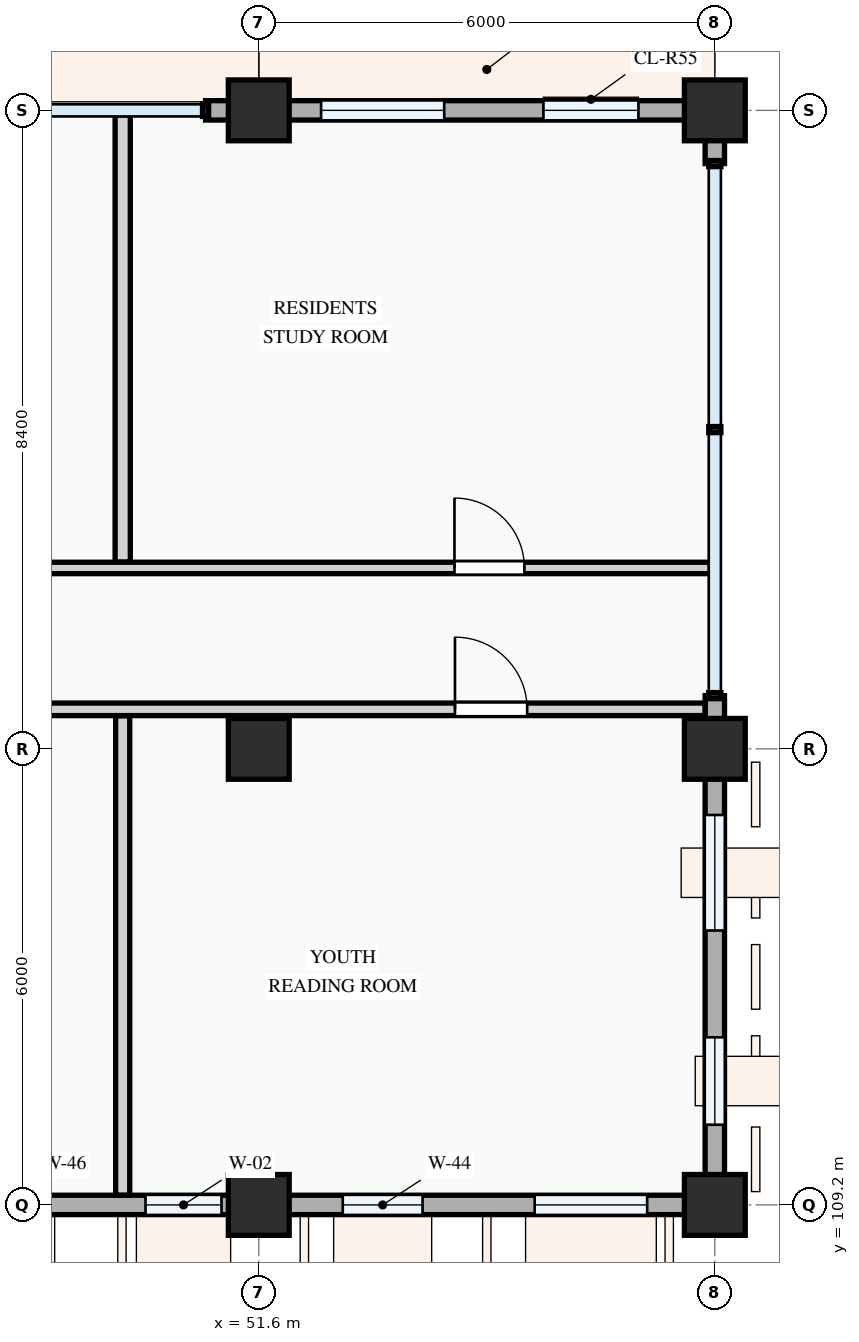
"""IFC4 building model, lengths in metres.
Left out: names, types, materials, properties, quantities, classifications, styles, units other than length and angle.
Written with IfcOpenShell. Run it as: python <this file> out.ifc"""

import sys

from ifc_helpers import new_model, si_unit, direction, frame, frame_2d, origin, origin_2d, place, context, subcontext, project, spatial, rectangle, extrude, element, fill, save


model = new_model("IFC4")
c1 = context("Model", 3, precision=1e-05, world=origin(), true_north=direction((0.0, 1.0)))
c2 = subcontext(c1, "Body", "Model", "MODEL_VIEW")
j1 = project(units=[si_unit("LENGTHUNIT", "METRE"), si_unit("PLANEANGLEUNIT", "RADIAN")], contexts=[c1])
p1 = place(None, origin())
s1 = spatial("IfcSite", under=j1, at=p1, CompositionType="ELEMENT")
p2 = place(p1, origin())
s2 = spatial("IfcBuilding", under=s1, at=p2, CompositionType="ELEMENT")
p3 = place(p2, frame((0.0, 0.0, 4.5)))
s3 = spatial("IfcBuildingStorey", under=s2, at=p3, CompositionType="ELEMENT", Elevation=4.5)
for number, where, z_axis, x_axis in (
    (1, (51.6, 109.2, 0.0), (0.0, 0.0, 1.0), (1.0, 0.0, 0.0)),
    (2, (51.6, 115.2, 0.0), (0.0, 0.0, 1.0), (1.0, 0.0, 0.0)),
    (3, (51.6, 123.6, 0.0), (0.0, 0.0, 1.0), (1.0, 0.0, 0.0)),
    (4, (57.6, 109.2, 0.0), (0.0, 0.0, 1.0), (1.0, 0.0, 0.0)),
    (5, (57.6, 115.2, 0.0), (0.0, 0.0, 1.0), (1.0, 0.0, 0.0)),
    (6, (57.6, 123.6, 0.0), (0.0, 0.0, 1.0), (1.0, 0.0, 0.0)),
):
    element("IfcColumn", number, at=place(p3, frame(where, z_axis=z_axis, x_axis=x_axis)), inside=s3, PredefinedType="COLUMN", context=c2, shape_type="SweptSolid", body=[
        extrude(rectangle(XDim=0.8, YDim=0.8, at=origin_2d()), origin(), (0.0, 0.0, 1.0), 3.6),
    ])
p4 = place(p3, frame((43.2, 109.2, 0.0), z_axis=(0.0, 0.0, 1.0), x_axis=(1.0, 0.0, 0.0)))
e7 = element("IfcWall", 7, at=p4, inside=s3, PredefinedType="STANDARD", context=c2, shape_type="SweptSolid", body=[
    extrude(rectangle(XDim=8.4, YDim=0.255, at=frame_2d((4.2, 0.0))), origin(), (0.0, 0.0, 1.0), 2.675),
])
p5 = place(p4, frame((0.63, 0.0, 0.78)))
e8 = element("IfcOpeningElement", 8, at=p5, cuts=e7, PredefinedType="OPENING", context=c2, shape_type="SweptSolid", body=[
    extrude(rectangle(XDim=2.4, YDim=1.65, at=frame_2d((1.2, 0.825))), frame((0.0, 0.137, 0.0), z_axis=(0.0, -1.0, 0.0), x_axis=(1.0, 0.0, 0.0)), (0.0, 0.0, 1.0), 0.275),
])
p6 = place(p4, frame((4.345, 0.0, 0.78)))
e9 = element("IfcOpeningElement", 9, at=p6, cuts=e7, PredefinedType="OPENING", context=c2, shape_type="SweptSolid", body=[
    extrude(rectangle(XDim=1.25, YDim=1.3, at=frame_2d((0.625, 0.65))), frame((0.0, 0.137, 0.0), z_axis=(0.0, -1.0, 0.0), x_axis=(1.0, 0.0, 0.0)), (0.0, 0.0, 1.0), 0.275),
])
p7 = place(p4, frame((6.91, 0.0, 0.78)))
e10 = element("IfcOpeningElement", 10, at=p7, cuts=e7, PredefinedType="OPENING", context=c2, shape_type="SweptSolid", body=[
    extrude(rectangle(XDim=1.0, YDim=1.25, at=frame_2d((0.5, 0.625))), frame((0.0, 0.137, 0.0), z_axis=(0.0, -1.0, 0.0), x_axis=(1.0, 0.0, 0.0)), (0.0, 0.0, 1.0), 0.275),
])
p8 = place(p3, frame((51.6, 109.2, 0.0), z_axis=(0.0, 0.0, 1.0), x_axis=(1.0, 0.0, 0.0)))
e11 = element("IfcWall", 11, at=p8, inside=s3, PredefinedType="STANDARD", context=c2, shape_type="SweptSolid", body=[
    extrude(rectangle(XDim=6.0, YDim=0.255, at=frame_2d((3.0, 0.0))), origin(), (0.0, 0.0, 1.0), 2.775),
])
p9 = place(p8, frame((1.105, 0.0, 0.78)))
e12 = element("IfcOpeningElement", 12, at=p9, cuts=e11, PredefinedType="OPENING", context=c2, shape_type="SweptSolid", body=[
    extrude(rectangle(XDim=1.05, YDim=1.2, at=frame_2d((0.525, 0.6))), frame((0.0, 0.137, 0.0), z_axis=(0.0, -1.0, 0.0), x_axis=(1.0, 0.0, 0.0)), (0.0, 0.0, 1.0), 0.275),
])
p10 = place(p8, frame((3.63, 0.0, 0.78)))
e13 = element("IfcOpeningElement", 13, at=p10, cuts=e11, PredefinedType="OPENING", context=c2, shape_type="SweptSolid", body=[
    extrude(rectangle(XDim=1.48, YDim=1.52, at=frame_2d((0.74, 0.76))), frame((0.0, 0.137, 0.0), z_axis=(0.0, -1.0, 0.0), x_axis=(1.0, 0.0, 0.0)), (0.0, 0.0, 1.0), 0.275),
])
p11 = place(p3, frame((57.6, 109.2, 0.0), z_axis=(0.0, 0.0, 1.0), x_axis=(0.0, 1.0, 0.0)))
e14 = element("IfcWall", 14, at=p11, inside=s3, PredefinedType="STANDARD", context=c2, shape_type="SweptSolid", body=[
    extrude(rectangle(XDim=6.0, YDim=0.255, at=frame_2d((3.0, 0.0))), origin(), (0.0, 0.0, 1.0), 2.875),
])
p12 = place(p11, frame((1.055, 0.0, 0.78)))
e15 = element("IfcOpeningElement", 15, at=p12, cuts=e14, PredefinedType="OPENING", context=c2, shape_type="SweptSolid", body=[
    extrude(rectangle(XDim=1.15, YDim=1.25, at=frame_2d((0.575, 0.625))), frame((0.0, 0.137, 0.0), z_axis=(0.0, -1.0, 0.0), x_axis=(1.0, 0.0, 0.0)), (0.0, 0.0, 1.0), 0.275),
])
p13 = place(p11, frame((3.61, 0.0, 0.78)))
e16 = element("IfcOpeningElement", 16, at=p13, cuts=e14, PredefinedType="OPENING", context=c2, shape_type="SweptSolid", body=[
    extrude(rectangle(XDim=1.52, YDim=1.42, at=frame_2d((0.76, 0.71))), frame((0.0, 0.137, 0.0), z_axis=(0.0, -1.0, 0.0), x_axis=(1.0, 0.0, 0.0)), (0.0, 0.0, 1.0), 0.275),
])
p14 = place(p3, frame((57.6, 115.2, 0.0), z_axis=(0.0, 0.0, 1.0), x_axis=(0.0, 1.0, 0.0)))
e17 = element("IfcWall", 17, at=p14, inside=s3, PredefinedType="STANDARD", context=c2, shape_type="SweptSolid", body=[
    extrude(rectangle(XDim=0.7, YDim=0.255, at=frame_2d((0.35, 0.0))), origin(), (0.0, 0.0, 1.0), 2.725),
])
p15 = place(p3, frame((57.6, 122.9, 0.0), z_axis=(0.0, 0.0, 1.0), x_axis=(0.0, 1.0, 0.0)))
e18 = element("IfcWall", 18, at=p15, inside=s3, PredefinedType="STANDARD", context=c2, shape_type="SweptSolid", body=[
    extrude(rectangle(XDim=0.571, YDim=0.255, at=frame_2d((0.285, 0.0))), origin(), (0.0, 0.0, 1.0), 3.34),
])
p16 = place(p3, frame((57.6, 123.6, 0.0), z_axis=(0.0, 0.0, 1.0), x_axis=(-1.0, 0.0, 0.0)))
e19 = element("IfcWall", 19, at=p16, inside=s3, PredefinedType="STANDARD", context=c2, shape_type="SweptSolid", body=[
    extrude(rectangle(XDim=6.0, YDim=0.255, at=frame_2d((3.0, 0.0))), origin(), (0.0, 0.0, 1.0), 2.775),
])
p17 = place(p16, frame((1.005, 0.0, 0.78)))
e20 = element("IfcOpeningElement", 20, at=p17, cuts=e19, PredefinedType="OPENING", context=c2, shape_type="SweptSolid", body=[
    extrude(rectangle(XDim=1.25, YDim=1.45, at=frame_2d((0.625, 0.725))), frame((0.0, 0.137, 0.0), z_axis=(0.0, -1.0, 0.0), x_axis=(1.0, 0.0, 0.0)), (0.0, 0.0, 1.0), 0.275),
])
p18 = place(p16, frame((3.56, 0.0, 0.78)))
e21 = element("IfcOpeningElement", 21, at=p18, cuts=e19, PredefinedType="OPENING", context=c2, shape_type="SweptSolid", body=[
    extrude(rectangle(XDim=1.62, YDim=1.38, at=frame_2d((0.81, 0.69))), frame((0.0, 0.137, 0.0), z_axis=(0.0, -1.0, 0.0), x_axis=(1.0, 0.0, 0.0)), (0.0, 0.0, 1.0), 0.275),
])
p19 = place(p3, frame((51.6, 123.6, 0.0), z_axis=(0.0, 0.0, 1.0), x_axis=(-1.0, 0.0, 0.0)))
e22 = element("IfcWall", 22, at=p19, inside=s3, PredefinedType="STANDARD", context=c2, shape_type="SweptSolid", body=[
    extrude(rectangle(XDim=0.7, YDim=0.255, at=frame_2d((0.35, 0.0))), origin(), (0.0, 0.0, 1.0), 2.675),
])
p20 = place(p3, frame((49.81, 109.33, 0.0), z_axis=(0.0, 0.0, 1.0), x_axis=(0.0, 1.0, 0.0)))
e23 = element("IfcWall", 23, at=p20, inside=s3, PredefinedType="PARTITIONING", context=c2, shape_type="SweptSolid", body=[
    extrude(rectangle(XDim=6.306, YDim=0.185, at=frame_2d((3.153, 0.0))), origin(), (0.0, 0.0, 1.0), 3.3),
])
p21 = place(p3, frame((49.81, 117.657, 0.0), z_axis=(0.0, 0.0, 1.0), x_axis=(0.0, 1.0, 0.0)))
e24 = element("IfcWall", 24, at=p21, inside=s3, PredefinedType="PARTITIONING", context=c2, shape_type="SweptSolid", body=[
    extrude(rectangle(XDim=5.883, YDim=0.2, at=frame_2d((2.941, 0.0))), origin(), (0.0, 0.0, 1.0), 3.3),
])
p22 = place(p3, frame((25.15, 115.72, 0.0), z_axis=(0.0, 0.0, 1.0), x_axis=(1.0, 0.0, 0.0)))
e25 = element("IfcWall", 25, at=p22, inside=s3, PredefinedType="PARTITIONING", context=c2, shape_type="SweptSolid", body=[
    extrude(rectangle(XDim=32.321, YDim=0.165, at=frame_2d((16.16, 0.0))), origin(), (0.0, 0.0, 1.0), 3.3),
])
p23 = place(p22, frame((6.9, 0.0, 0.0)))
e26 = element("IfcOpeningElement", 26, at=p23, cuts=e25, PredefinedType="OPENING", context=c2, shape_type="SweptSolid", body=[
    extrude(rectangle(XDim=0.95, YDim=2.1, at=frame_2d((0.475, 1.05))), frame((0.0, 0.093, 0.0), z_axis=(0.0, -1.0, 0.0), x_axis=(1.0, 0.0, 0.0)), (0.0, 0.0, 1.0), 0.185),
])
p24 = place(p22, frame((8.35, 0.0, 0.0)))
e27 = element("IfcOpeningElement", 27, at=p24, cuts=e25, PredefinedType="OPENING", context=c2, shape_type="SweptSolid", body=[
    extrude(rectangle(XDim=0.95, YDim=2.1, at=frame_2d((0.475, 1.05))), frame((0.0, 0.093, 0.0), z_axis=(0.0, -1.0, 0.0), x_axis=(1.0, 0.0, 0.0)), (0.0, 0.0, 1.0), 0.185),
])
p25 = place(p22, frame((21.718, 0.0, 0.0)))
e28 = element("IfcOpeningElement", 28, at=p25, cuts=e25, PredefinedType="OPENING", context=c2, shape_type="SweptSolid", body=[
    extrude(rectangle(XDim=0.95, YDim=2.1, at=frame_2d((0.475, 1.05))), frame((0.0, 0.093, 0.0), z_axis=(0.0, -1.0, 0.0), x_axis=(1.0, 0.0, 0.0)), (0.0, 0.0, 1.0), 0.185),
])
p26 = place(p22, frame((29.031, 0.0, 0.0)))
e29 = element("IfcOpeningElement", 29, at=p26, cuts=e25, PredefinedType="OPENING", context=c2, shape_type="SweptSolid", body=[
    extrude(rectangle(XDim=0.95, YDim=2.1, at=frame_2d((0.475, 1.05))), frame((0.0, 0.093, 0.0), z_axis=(0.0, -1.0, 0.0), x_axis=(1.0, 0.0, 0.0)), (0.0, 0.0, 1.0), 0.185),
])
p27 = place(p3, frame((22.66, 117.58, 0.0), z_axis=(0.0, 0.0, 1.0), x_axis=(1.0, 0.0, 0.0)))
e30 = element("IfcWall", 30, at=p27, inside=s3, PredefinedType="PARTITIONING", context=c2, shape_type="SweptSolid", body=[
    extrude(rectangle(XDim=34.88, YDim=0.15, at=frame_2d((17.44, 0.0))), origin(), (0.0, 0.0, 1.0), 3.3),
])
p28 = place(p27, frame((9.38, 0.0, 0.0)))
e31 = element("IfcOpeningElement", 31, at=p28, cuts=e30, PredefinedType="OPENING", context=c2, shape_type="SweptSolid", body=[
    extrude(rectangle(XDim=0.92, YDim=2.1, at=frame_2d((0.46, 1.05))), frame((0.0, 0.085, 0.0), z_axis=(0.0, -1.0, 0.0), x_axis=(1.0, 0.0, 0.0)), (0.0, 0.0, 1.0), 0.17),
])
p29 = place(p27, frame((10.84, 0.0, 0.0)))
e32 = element("IfcOpeningElement", 32, at=p29, cuts=e30, PredefinedType="OPENING", context=c2, shape_type="SweptSolid", body=[
    extrude(rectangle(XDim=0.92, YDim=2.1, at=frame_2d((0.46, 1.05))), frame((0.0, 0.085, 0.0), z_axis=(0.0, -1.0, 0.0), x_axis=(1.0, 0.0, 0.0)), (0.0, 0.0, 1.0), 0.17),
])
p30 = place(p27, frame((24.2, 0.0, 0.0)))
e33 = element("IfcOpeningElement", 33, at=p30, cuts=e30, PredefinedType="OPENING", context=c2, shape_type="SweptSolid", body=[
    extrude(rectangle(XDim=0.92, YDim=2.1, at=frame_2d((0.46, 1.05))), frame((0.0, 0.085, 0.0), z_axis=(0.0, -1.0, 0.0), x_axis=(1.0, 0.0, 0.0)), (0.0, 0.0, 1.0), 0.17),
])
p31 = place(p27, frame((31.515, 0.0, 0.0)))
e34 = element("IfcOpeningElement", 34, at=p31, cuts=e30, PredefinedType="OPENING", context=c2, shape_type="SweptSolid", body=[
    extrude(rectangle(XDim=0.92, YDim=2.1, at=frame_2d((0.46, 1.05))), frame((0.0, 0.085, 0.0), z_axis=(0.0, -1.0, 0.0), x_axis=(1.0, 0.0, 0.0)), (0.0, 0.0, 1.0), 0.17),
])
p32 = place(p7, origin())
e35 = element("IfcWindow", 35, at=p32, inside=s3, PartitioningType="SINGLE_PANEL", PredefinedType="WINDOW", context=c2, shape_type="SweptSolid", body=[
    extrude(rectangle(XDim=1.0, YDim=1.25, at=frame_2d((0.5, 0.625))), frame((0.0, 0.03, 0.0), z_axis=(0.0, -1.0, 0.0), x_axis=(1.0, 0.0, 0.0)), (0.0, 0.0, 1.0), 0.06),
])
fill(e10, e35)
p33 = place(p9, origin())
e36 = element("IfcWindow", 36, at=p33, inside=s3, PartitioningType="SINGLE_PANEL", PredefinedType="WINDOW", context=c2, shape_type="SweptSolid", body=[
    extrude(rectangle(XDim=1.05, YDim=1.2, at=frame_2d((0.525, 0.6))), frame((0.0, 0.03, 0.0), z_axis=(0.0, -1.0, 0.0), x_axis=(1.0, 0.0, 0.0)), (0.0, 0.0, 1.0), 0.06),
])
fill(e12, e36)
p34 = place(p10, origin())
e37 = element("IfcWindow", 37, at=p34, inside=s3, PartitioningType="SINGLE_PANEL", PredefinedType="WINDOW", context=c2, shape_type="SweptSolid", body=[
    extrude(rectangle(XDim=1.48, YDim=1.52, at=frame_2d((0.74, 0.76))), frame((0.0, 0.03, 0.0), z_axis=(0.0, -1.0, 0.0), x_axis=(1.0, 0.0, 0.0)), (0.0, 0.0, 1.0), 0.06),
])
fill(e13, e37)
p35 = place(p12, origin())
e38 = element("IfcWindow", 38, at=p35, inside=s3, PartitioningType="SINGLE_PANEL", PredefinedType="WINDOW", context=c2, shape_type="SweptSolid", body=[
    extrude(rectangle(XDim=1.15, YDim=1.25, at=frame_2d((0.575, 0.625))), frame((0.0, 0.03, 0.0), z_axis=(0.0, -1.0, 0.0), x_axis=(1.0, 0.0, 0.0)), (0.0, 0.0, 1.0), 0.06),
])
fill(e15, e38)
p36 = place(p13, origin())
e39 = element("IfcWindow", 39, at=p36, inside=s3, PartitioningType="SINGLE_PANEL", PredefinedType="WINDOW", context=c2, shape_type="SweptSolid", body=[
    extrude(rectangle(XDim=1.52, YDim=1.42, at=frame_2d((0.76, 0.71))), frame((0.0, 0.03, 0.0), z_axis=(0.0, -1.0, 0.0), x_axis=(1.0, 0.0, 0.0)), (0.0, 0.0, 1.0), 0.06),
])
fill(e16, e39)
p37 = place(p17, origin())
e40 = element("IfcWindow", 40, at=p37, inside=s3, PartitioningType="SINGLE_PANEL", PredefinedType="WINDOW", context=c2, shape_type="SweptSolid", body=[
    extrude(rectangle(XDim=1.25, YDim=1.45, at=frame_2d((0.625, 0.725))), frame((0.0, 0.03, 0.0), z_axis=(0.0, -1.0, 0.0), x_axis=(1.0, 0.0, 0.0)), (0.0, 0.0, 1.0), 0.06),
])
fill(e20, e40)
p38 = place(p18, origin())
e41 = element("IfcWindow", 41, at=p38, inside=s3, PartitioningType="DOUBLE_PANEL_VERTICAL", PredefinedType="WINDOW", context=c2, shape_type="SweptSolid", body=[
    extrude(rectangle(XDim=1.62, YDim=1.38, at=frame_2d((0.81, 0.69))), frame((0.0, 0.03, 0.0), z_axis=(0.0, -1.0, 0.0), x_axis=(1.0, 0.0, 0.0)), (0.0, 0.0, 1.0), 0.06),
])
fill(e21, e41)
p39 = place(p26, origin())
e42 = element("IfcDoor", 42, at=p39, inside=s3, OperationType="SINGLE_SWING_LEFT", PredefinedType="DOOR", context=c2, shape_type="SweptSolid", body=[
    extrude(rectangle(XDim=0.95, YDim=2.1, at=frame_2d((0.475, 1.05))), frame((0.0, 0.025, 0.0), z_axis=(0.0, -1.0, 0.0), x_axis=(1.0, 0.0, 0.0)), (0.0, 0.0, 1.0), 0.05),
])
fill(e29, e42)
p40 = place(p31, origin())
e43 = element("IfcDoor", 43, at=p40, inside=s3, OperationType="SINGLE_SWING_LEFT", PredefinedType="DOOR", context=c2, shape_type="SweptSolid", body=[
    extrude(rectangle(XDim=0.92, YDim=2.1, at=frame_2d((0.46, 1.05))), frame((0.0, 0.025, 0.0), z_axis=(0.0, -1.0, 0.0), x_axis=(1.0, 0.0, 0.0)), (0.0, 0.0, 1.0), 0.05),
])
fill(e34, e43)
save(model, sys.argv[1])
